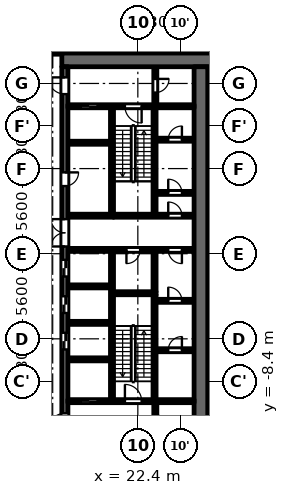
"""IFC4 building model, lengths in metres.
Left out: names, types, materials, properties, quantities, classifications, styles, units other than length and angle.
Written with IfcOpenShell. Run it as: python <this file> out.ifc"""

import sys

from ifc_helpers import new_model, si_unit, direction, frame, frame_2d, origin, place, context, subcontext, project, spatial, rectangle, extrude, element, fill, save


model = new_model("IFC4")
c1 = context("Model", 3, precision=1e-05, world=origin(), true_north=direction((0.0, 1.0)))
c2 = subcontext(c1, "Body", "Model", "MODEL_VIEW")
j1 = project(units=[si_unit("LENGTHUNIT", "METRE"), si_unit("PLANEANGLEUNIT", "RADIAN")], contexts=[c1])
p1 = place(None, origin())
s1 = spatial("IfcSite", under=j1, at=p1, CompositionType="ELEMENT")
p2 = place(p1, origin())
s2 = spatial("IfcBuilding", under=s1, at=p2, CompositionType="ELEMENT")
p3 = place(p2, frame((0.0, 0.0, 11.3)))
s3 = spatial("IfcBuildingStorey", under=s2, at=p3, CompositionType="ELEMENT", Elevation=11.3)
p4 = place(p3, frame((23.5, -2.5, 0.0), z_axis=(0.0, 0.0, 1.0), x_axis=(0.0, 1.0, 0.0)))
e1 = element("IfcWall", 1, at=p4, inside=s3, PredefinedType="PARTITIONING", context=c2, shape_type="SweptSolid", body=[
    extrude(rectangle(XDim=2.65, YDim=0.2, at=frame_2d((1.325, 0.0))), origin(), (0.0, 0.0, 1.0), 4.45),
])
p5 = place(p3, frame((20.7, 2.6, 0.0), z_axis=(0.0, 0.0, 1.0), x_axis=(0.0, 1.0, 0.0)))
e2 = element("IfcWall", 2, at=p5, inside=s3, PredefinedType="SHEAR", context=c2, shape_type="SweptSolid", body=[
    extrude(rectangle(XDim=7.0, YDim=0.2, at=frame_2d((3.5, 0.0))), origin(), (0.0, 0.0, 1.0), 4.45),
])
p6 = place(p3, frame((20.7, -9.6, 0.0), z_axis=(0.0, 0.0, 1.0), x_axis=(0.0, 1.0, 0.0)))
e3 = element("IfcWall", 3, at=p6, inside=s3, PredefinedType="SHEAR", context=c2, shape_type="SweptSolid", body=[
    extrude(rectangle(XDim=9.75, YDim=0.2, at=frame_2d((4.875, 0.0))), origin(), (0.0, 0.0, 1.0), 4.45),
])
p7 = place(p3, frame((20.8, 2.5, 0.0), z_axis=(0.0, 0.0, 1.0), x_axis=(1.0, 0.0, 0.0)))
e4 = element("IfcWall", 4, at=p7, inside=s3, PredefinedType="SHEAR", context=c2, shape_type="SweptSolid", body=[
    extrude(rectangle(XDim=5.3, YDim=0.2, at=frame_2d((2.65, 0.0))), origin(), (0.0, 0.0, 1.0), 4.45),
])
p8 = place(p7, frame((3.6, 0.0, 0.0)))
e5 = element("IfcOpeningElement", 5, at=p8, cuts=e4, PredefinedType="OPENING", context=c2, shape_type="SweptSolid", body=[
    extrude(rectangle(XDim=0.9, YDim=2.1, at=frame_2d((0.45, 1.05))), frame((0.0, 0.11, 0.0), z_axis=(0.0, -1.0, 0.0), x_axis=(1.0, 0.0, 0.0)), (0.0, 0.0, 1.0), 0.22),
])
p9 = place(p3, frame((20.8, 0.25, 0.0), z_axis=(0.0, 0.0, 1.0), x_axis=(1.0, 0.0, 0.0)))
e6 = element("IfcWall", 6, at=p9, inside=s3, PredefinedType="PARTITIONING", context=c2, shape_type="SweptSolid", body=[
    extrude(rectangle(XDim=5.3, YDim=0.2, at=frame_2d((2.65, 0.0))), origin(), (0.0, 0.0, 1.0), 4.45),
])
p10 = place(p9, frame((0.85, 0.0, 0.0)))
e7 = element("IfcOpeningElement", 7, at=p10, cuts=e6, PredefinedType="OPENING", context=c2, shape_type="SweptSolid", body=[
    extrude(rectangle(XDim=0.9, YDim=2.1, at=frame_2d((0.45, 1.05))), frame((0.0, 0.11, 0.0), z_axis=(0.0, -1.0, 0.0), x_axis=(1.0, 0.0, 0.0)), (0.0, 0.0, 1.0), 0.22),
])
p11 = place(p9, frame((3.6, 0.0, 0.0)))
e8 = element("IfcOpeningElement", 8, at=p11, cuts=e6, PredefinedType="OPENING", context=c2, shape_type="SweptSolid", body=[
    extrude(rectangle(XDim=0.9, YDim=2.1, at=frame_2d((0.45, 1.05))), frame((0.0, 0.11, 0.0), z_axis=(0.0, -1.0, 0.0), x_axis=(1.0, 0.0, 0.0)), (0.0, 0.0, 1.0), 0.22),
])
p12 = place(p3, frame((17.4, 12.75, 0.0), z_axis=(0.0, 0.0, 1.0), x_axis=(1.0, 0.0, 0.0)))
e9 = element("IfcWall", 9, at=p12, inside=s3, PredefinedType="SHEAR", context=c2, shape_type="SweptSolid", body=[
    extrude(rectangle(XDim=10.4, YDim=0.9, at=frame_2d((5.2, 0.0))), origin(), (0.0, 0.0, 1.0), 4.45),
])
p13 = place(p3, frame((17.6, -12.3, 0.0), z_axis=(0.0, 0.0, 1.0), x_axis=(0.0, 1.0, 0.0)))
e10 = element("IfcWall", 10, at=p13, inside=s3, PredefinedType="SHEAR", context=c2, shape_type="SweptSolid", body=[
    extrude(rectangle(XDim=24.6, YDim=0.4, at=frame_2d((12.3, 0.0))), origin(), (0.0, 0.0, 1.0), 4.45),
])
p14 = place(p13, frame((6.0, 0.0, 0.0)))
e11 = element("IfcOpeningElement", 11, at=p14, cuts=e10, PredefinedType="OPENING", context=c2, shape_type="SweptSolid", body=[
    extrude(rectangle(XDim=1.1, YDim=2.1, at=frame_2d((0.55, 1.05))), frame((0.0, 0.21, 0.0), z_axis=(0.0, -1.0, 0.0), x_axis=(1.0, 0.0, 0.0)), (0.0, 0.0, 1.0), 0.42),
])
p15 = place(p13, frame((8.4, 0.0, 0.0)))
e12 = element("IfcOpeningElement", 12, at=p15, cuts=e10, PredefinedType="OPENING", context=c2, shape_type="SweptSolid", body=[
    extrude(rectangle(XDim=1.1, YDim=2.1, at=frame_2d((0.55, 1.05))), frame((0.0, 0.21, 0.0), z_axis=(0.0, -1.0, 0.0), x_axis=(1.0, 0.0, 0.0)), (0.0, 0.0, 1.0), 0.42),
])
p16 = place(p13, frame((10.8, 0.0, 0.0)))
e13 = element("IfcOpeningElement", 13, at=p16, cuts=e10, PredefinedType="OPENING", context=c2, shape_type="SweptSolid", body=[
    extrude(rectangle(XDim=1.1, YDim=2.1, at=frame_2d((0.55, 1.05))), frame((0.0, 0.21, 0.0), z_axis=(0.0, -1.0, 0.0), x_axis=(1.0, 0.0, 0.0)), (0.0, 0.0, 1.0), 0.42),
])
p17 = place(p13, frame((16.75, 0.0, 0.0)))
e14 = element("IfcOpeningElement", 14, at=p17, cuts=e10, PredefinedType="OPENING", context=c2, shape_type="SweptSolid", body=[
    extrude(rectangle(XDim=0.9, YDim=2.1, at=frame_2d((0.45, 1.05))), frame((0.0, 0.21, 0.0), z_axis=(0.0, -1.0, 0.0), x_axis=(1.0, 0.0, 0.0)), (0.0, 0.0, 1.0), 0.42),
])
p18 = place(p13, frame((22.8, 0.0, 0.0)))
e15 = element("IfcOpeningElement", 15, at=p18, cuts=e10, PredefinedType="OPENING", context=c2, shape_type="SweptSolid", body=[
    extrude(rectangle(XDim=1.1, YDim=2.1, at=frame_2d((0.55, 1.05))), frame((0.0, 0.21, 0.0), z_axis=(0.0, -1.0, 0.0), x_axis=(1.0, 0.0, 0.0)), (0.0, 0.0, 1.0), 0.42),
])
p19 = place(p13, frame((0.7, 0.0, 0.0)))
e16 = element("IfcOpeningElement", 16, at=p19, cuts=e10, PredefinedType="OPENING", context=c2, shape_type="SweptSolid", body=[
    extrude(rectangle(XDim=1.1, YDim=2.1, at=frame_2d((0.55, 1.05))), frame((0.0, 0.21, 0.0), z_axis=(0.0, -1.0, 0.0), x_axis=(1.0, 0.0, 0.0)), (0.0, 0.0, 1.0), 0.42),
])
p20 = place(p13, frame((12.775, 0.0, 0.0)))
e17 = element("IfcOpeningElement", 17, at=p20, cuts=e10, PredefinedType="OPENING", context=c2, shape_type="SweptSolid", body=[
    extrude(rectangle(XDim=1.8, YDim=2.1, at=frame_2d((0.9, 1.05))), frame((0.0, 0.21, 0.0), z_axis=(0.0, -1.0, 0.0), x_axis=(1.0, 0.0, 0.0)), (0.0, 0.0, 1.0), 0.42),
])
p21 = place(p3, frame((26.55, -12.3, 0.0), z_axis=(0.0, 0.0, 1.0), x_axis=(0.0, 1.0, 0.0)))
e18 = element("IfcWall", 18, at=p21, inside=s3, PredefinedType="SHEAR", context=c2, shape_type="SweptSolid", body=[
    extrude(rectangle(XDim=24.6, YDim=0.9, at=frame_2d((12.3, 0.0))), origin(), (0.0, 0.0, 1.0), 4.45),
])
p22 = place(p3, frame((23.55, 9.8, 0.0), z_axis=(0.0, 0.0, 1.0), x_axis=(0.0, 1.0, 0.0)))
e19 = element("IfcWall", 19, at=p22, inside=s3, PredefinedType="PARTITIONING", context=c2, shape_type="SweptSolid", body=[
    extrude(rectangle(XDim=2.5, YDim=0.2, at=frame_2d((1.25, 0.0))), origin(), (0.0, 0.0, 1.0), 4.45),
])
p23 = place(p22, frame((0.8, 0.0, 0.0)))
e20 = element("IfcOpeningElement", 20, at=p23, cuts=e19, PredefinedType="OPENING", context=c2, shape_type="SweptSolid", body=[
    extrude(rectangle(XDim=0.9, YDim=2.1, at=frame_2d((0.45, 1.05))), frame((0.0, 0.11, 0.0), z_axis=(0.0, -1.0, 0.0), x_axis=(1.0, 0.0, 0.0)), (0.0, 0.0, 1.0), 0.22),
])
p24 = place(p3, frame((23.55, -12.3, 0.0), z_axis=(0.0, 0.0, 1.0), x_axis=(0.0, 1.0, 0.0)))
e21 = element("IfcWall", 21, at=p24, inside=s3, PredefinedType="PARTITIONING", context=c2, shape_type="SweptSolid", body=[
    extrude(rectangle(XDim=2.5, YDim=0.2, at=frame_2d((1.25, 0.0))), origin(), (0.0, 0.0, 1.0), 4.45),
])
p25 = place(p24, frame((0.8, 0.0, 0.0)))
e22 = element("IfcOpeningElement", 22, at=p25, cuts=e21, PredefinedType="OPENING", context=c2, shape_type="SweptSolid", body=[
    extrude(rectangle(XDim=0.9, YDim=2.1, at=frame_2d((0.45, 1.05))), frame((0.0, 0.11, 0.0), z_axis=(0.0, -1.0, 0.0), x_axis=(1.0, 0.0, 0.0)), (0.0, 0.0, 1.0), 0.22),
])
p26 = place(p3, frame((23.6, -6.35, 0.0), z_axis=(0.0, 0.0, 1.0), x_axis=(1.0, 0.0, 0.0)))
e23 = element("IfcWall", 23, at=p26, inside=s3, PredefinedType="PARTITIONING", context=c2, shape_type="SweptSolid", body=[
    extrude(rectangle(XDim=2.5, YDim=0.2, at=frame_2d((1.25, 0.0))), origin(), (0.0, 0.0, 1.0), 4.45),
])
p27 = place(p26, frame((0.8, 0.0, 0.0)))
e24 = element("IfcOpeningElement", 24, at=p27, cuts=e23, PredefinedType="OPENING", context=c2, shape_type="SweptSolid", body=[
    extrude(rectangle(XDim=0.9, YDim=2.1, at=frame_2d((0.45, 1.05))), frame((0.0, 0.11, 0.0), z_axis=(0.0, -1.0, 0.0), x_axis=(1.0, 0.0, 0.0)), (0.0, 0.0, 1.0), 0.22),
])
p28 = place(p3, frame((23.6, -3.1, 0.0), z_axis=(0.0, 0.0, 1.0), x_axis=(1.0, 0.0, 0.0)))
e25 = element("IfcWall", 25, at=p28, inside=s3, PredefinedType="PARTITIONING", context=c2, shape_type="SweptSolid", body=[
    extrude(rectangle(XDim=2.5, YDim=0.2, at=frame_2d((1.25, 0.0))), origin(), (0.0, 0.0, 1.0), 4.45),
])
p29 = place(p28, frame((0.8, 0.0, 0.0)))
e26 = element("IfcOpeningElement", 26, at=p29, cuts=e25, PredefinedType="OPENING", context=c2, shape_type="SweptSolid", body=[
    extrude(rectangle(XDim=0.9, YDim=2.1, at=frame_2d((0.45, 1.05))), frame((0.0, 0.11, 0.0), z_axis=(0.0, -1.0, 0.0), x_axis=(1.0, 0.0, 0.0)), (0.0, 0.0, 1.0), 0.22),
])
p30 = place(p3, frame((23.6, 4.0, 0.0), z_axis=(0.0, 0.0, 1.0), x_axis=(1.0, 0.0, 0.0)))
e27 = element("IfcWall", 27, at=p30, inside=s3, PredefinedType="PARTITIONING", context=c2, shape_type="SweptSolid", body=[
    extrude(rectangle(XDim=2.5, YDim=0.2, at=frame_2d((1.25, 0.0))), origin(), (0.0, 0.0, 1.0), 4.45),
])
p31 = place(p30, frame((0.8, 0.0, 0.0)))
e28 = element("IfcOpeningElement", 28, at=p31, cuts=e27, PredefinedType="OPENING", context=c2, shape_type="SweptSolid", body=[
    extrude(rectangle(XDim=0.9, YDim=2.1, at=frame_2d((0.45, 1.05))), frame((0.0, 0.11, 0.0), z_axis=(0.0, -1.0, 0.0), x_axis=(1.0, 0.0, 0.0)), (0.0, 0.0, 1.0), 0.22),
])
p32 = place(p3, frame((23.6, 7.5, 0.0), z_axis=(0.0, 0.0, 1.0), x_axis=(1.0, 0.0, 0.0)))
e29 = element("IfcWall", 29, at=p32, inside=s3, PredefinedType="PARTITIONING", context=c2, shape_type="SweptSolid", body=[
    extrude(rectangle(XDim=2.5, YDim=0.2, at=frame_2d((1.25, 0.0))), origin(), (0.0, 0.0, 1.0), 4.45),
])
p33 = place(p32, frame((0.8, 0.0, 0.0)))
e30 = element("IfcOpeningElement", 30, at=p33, cuts=e29, PredefinedType="OPENING", context=c2, shape_type="SweptSolid", body=[
    extrude(rectangle(XDim=0.9, YDim=2.1, at=frame_2d((0.45, 1.05))), frame((0.0, 0.11, 0.0), z_axis=(0.0, -1.0, 0.0), x_axis=(1.0, 0.0, 0.0)), (0.0, 0.0, 1.0), 0.22),
])
p34 = place(p3, frame((17.8, -9.7, 0.0), z_axis=(0.0, 0.0, 1.0), x_axis=(1.0, 0.0, 0.0)))
e31 = element("IfcWall", 31, at=p34, inside=s3, PredefinedType="SHEAR", context=c2, shape_type="SweptSolid", body=[
    extrude(rectangle(XDim=8.3, YDim=0.2, at=frame_2d((4.15, 0.0))), origin(), (0.0, 0.0, 1.0), 4.45),
])
p35 = place(p34, frame((0.85, 0.0, 0.0)))
e32 = element("IfcOpeningElement", 32, at=p35, cuts=e31, PredefinedType="OPENING", context=c2, shape_type="SweptSolid", body=[
    extrude(rectangle(XDim=1.1, YDim=2.1, at=frame_2d((0.55, 1.05))), frame((0.0, 0.11, 0.0), z_axis=(0.0, -1.0, 0.0), x_axis=(1.0, 0.0, 0.0)), (0.0, 0.0, 1.0), 0.22),
])
p36 = place(p34, frame((3.75, 0.0, 0.0)))
e33 = element("IfcOpeningElement", 33, at=p36, cuts=e31, PredefinedType="OPENING", context=c2, shape_type="SweptSolid", body=[
    extrude(rectangle(XDim=1.1, YDim=2.1, at=frame_2d((0.55, 1.05))), frame((0.0, 0.11, 0.0), z_axis=(0.0, -1.0, 0.0), x_axis=(1.0, 0.0, 0.0)), (0.0, 0.0, 1.0), 0.22),
])
for number, where, z_axis, x_axis in (
    (34, (17.8, -6.95, 0.0), (0.0, 0.0, 1.0), (1.0, 0.0, 0.0)),
    (35, (17.8, -4.55, 0.0), (0.0, 0.0, 1.0), (1.0, 0.0, 0.0)),
    (36, (17.8, -2.15, 0.0), (0.0, 0.0, 1.0), (1.0, 0.0, 0.0)),
):
    element("IfcWall", number, at=place(p3, frame(where, z_axis=z_axis, x_axis=x_axis)), inside=s3, PredefinedType="PARTITIONING", context=c2, shape_type="SweptSolid", body=[
        extrude(rectangle(XDim=2.8, YDim=0.2, at=frame_2d((1.4, 0.0))), origin(), (0.0, 0.0, 1.0), 4.45),
    ])
for number, where, z_axis, x_axis in (
    (37, (17.8, 0.25, 0.0), (0.0, 0.0, 1.0), (1.0, 0.0, 0.0)),
    (38, (17.8, 2.5, 0.0), (0.0, 0.0, 1.0), (1.0, 0.0, 0.0)),
):
    element("IfcWall", number, at=place(p3, frame(where, z_axis=z_axis, x_axis=x_axis)), inside=s3, PredefinedType="PARTITIONING", context=c2, shape_type="SweptSolid", body=[
        extrude(rectangle(XDim=3.0, YDim=0.2, at=frame_2d((1.5, 0.0))), origin(), (0.0, 0.0, 1.0), 4.45),
    ])
p37 = place(p3, frame((17.8, 7.3, 0.0), z_axis=(0.0, 0.0, 1.0), x_axis=(1.0, 0.0, 0.0)))
e39 = element("IfcWall", 39, at=p37, inside=s3, PredefinedType="PARTITIONING", context=c2, shape_type="SweptSolid", body=[
    extrude(rectangle(XDim=2.8, YDim=0.2, at=frame_2d((1.4, 0.0))), origin(), (0.0, 0.0, 1.0), 4.45),
])
p38 = place(p3, frame((17.8, 9.7, 0.0), z_axis=(0.0, 0.0, 1.0), x_axis=(1.0, 0.0, 0.0)))
e40 = element("IfcWall", 40, at=p38, inside=s3, PredefinedType="SHEAR", context=c2, shape_type="SweptSolid", body=[
    extrude(rectangle(XDim=8.3, YDim=0.2, at=frame_2d((4.15, 0.0))), origin(), (0.0, 0.0, 1.0), 4.45),
])
p39 = place(p38, frame((0.85, 0.0, 0.0)))
e41 = element("IfcOpeningElement", 41, at=p39, cuts=e40, PredefinedType="OPENING", context=c2, shape_type="SweptSolid", body=[
    extrude(rectangle(XDim=1.1, YDim=2.1, at=frame_2d((0.55, 1.05))), frame((0.0, 0.11, 0.0), z_axis=(0.0, -1.0, 0.0), x_axis=(1.0, 0.0, 0.0)), (0.0, 0.0, 1.0), 0.22),
])
p40 = place(p38, frame((3.75, 0.0, 0.0)))
e42 = element("IfcOpeningElement", 42, at=p40, cuts=e40, PredefinedType="OPENING", context=c2, shape_type="SweptSolid", body=[
    extrude(rectangle(XDim=1.1, YDim=2.1, at=frame_2d((0.55, 1.05))), frame((0.0, 0.11, 0.0), z_axis=(0.0, -1.0, 0.0), x_axis=(1.0, 0.0, 0.0)), (0.0, 0.0, 1.0), 0.22),
])
p41 = place(p3, frame((23.5, 2.6, 0.0), z_axis=(0.0, 0.0, 1.0), x_axis=(0.0, 1.0, 0.0)))
e43 = element("IfcWall", 43, at=p41, inside=s3, PredefinedType="SHEAR", context=c2, shape_type="SweptSolid", body=[
    extrude(rectangle(XDim=7.0, YDim=0.2, at=frame_2d((3.5, 0.0))), origin(), (0.0, 0.0, 1.0), 4.45),
])
p42 = place(p3, frame((23.5, -9.6, 0.0), z_axis=(0.0, 0.0, 1.0), x_axis=(0.0, 1.0, 0.0)))
e44 = element("IfcWall", 44, at=p42, inside=s3, PredefinedType="SHEAR", context=c2, shape_type="SweptSolid", body=[
    extrude(rectangle(XDim=6.9, YDim=0.2, at=frame_2d((3.45, 0.0))), origin(), (0.0, 0.0, 1.0), 4.45),
])
p43 = place(p3, frame((20.8, -2.6, 0.0), z_axis=(0.0, 0.0, 1.0), x_axis=(1.0, 0.0, 0.0)))
e45 = element("IfcWall", 45, at=p43, inside=s3, PredefinedType="SHEAR", context=c2, shape_type="SweptSolid", body=[
    extrude(rectangle(XDim=2.8, YDim=0.2, at=frame_2d((1.4, 0.0))), origin(), (0.0, 0.0, 1.0), 4.45),
])
p44 = place(p3, frame((-17.4, 13.2, 0.0), z_axis=(0.0, 0.0, 1.0), x_axis=(1.0, 0.0, 0.0)))
e46 = element("IfcWall", 46, at=p44, inside=s3, PredefinedType="PARTITIONING", context=c2, shape_type="SweptSolid", body=[
    extrude(rectangle(XDim=34.8, YDim=0.15, at=frame_2d((17.4, 0.0))), origin(), (0.0, 0.0, 1.0), 4.45),
])
p45 = place(p44, frame((3.05, 0.0, 0.0)))
e47 = element("IfcOpeningElement", 47, at=p45, cuts=e46, PredefinedType="OPENING", context=c2, shape_type="SweptSolid", body=[
    extrude(rectangle(XDim=1.8, YDim=2.1, at=frame_2d((0.9, 1.05))), frame((0.0, 0.085, 0.0), z_axis=(0.0, -1.0, 0.0), x_axis=(1.0, 0.0, 0.0)), (0.0, 0.0, 1.0), 0.17),
])
p46 = place(p44, frame((0.75, 0.0, 0.0)))
e48 = element("IfcOpeningElement", 48, at=p46, cuts=e46, PredefinedType="OPENING", context=c2, shape_type="SweptSolid", body=[
    extrude(rectangle(XDim=1.0, YDim=2.1, at=frame_2d((0.5, 1.05))), frame((0.0, 0.085, 0.0), z_axis=(0.0, -1.0, 0.0), x_axis=(1.0, 0.0, 0.0)), (0.0, 0.0, 1.0), 0.17),
])
p47 = place(p44, frame((33.15, 0.0, 0.0)))
e49 = element("IfcOpeningElement", 49, at=p47, cuts=e46, PredefinedType="OPENING", context=c2, shape_type="SweptSolid", body=[
    extrude(rectangle(XDim=1.0, YDim=2.1, at=frame_2d((0.5, 1.05))), frame((0.0, 0.085, 0.0), z_axis=(0.0, -1.0, 0.0), x_axis=(1.0, 0.0, 0.0)), (0.0, 0.0, 1.0), 0.17),
])
p48 = place(p35, origin())
e50 = element("IfcDoor", 50, at=p48, inside=s3, OperationType="DOUBLE_DOOR_SLIDING", PredefinedType="DOOR", context=c2, shape_type="SweptSolid", body=[
    extrude(rectangle(XDim=1.1, YDim=2.1, at=frame_2d((0.55, 1.05))), frame((0.0, 0.025, 0.0), z_axis=(0.0, -1.0, 0.0), x_axis=(1.0, 0.0, 0.0)), (0.0, 0.0, 1.0), 0.05),
])
fill(e32, e50)
p49 = place(p14, origin())
e51 = element("IfcDoor", 51, at=p49, inside=s3, OperationType="DOUBLE_DOOR_SLIDING", PredefinedType="DOOR", context=c2, shape_type="SweptSolid", body=[
    extrude(rectangle(XDim=1.1, YDim=2.1, at=frame_2d((0.55, 1.05))), frame((0.0, 0.025, 0.0), z_axis=(0.0, -1.0, 0.0), x_axis=(1.0, 0.0, 0.0)), (0.0, 0.0, 1.0), 0.05),
])
fill(e11, e51)
p50 = place(p15, origin())
e52 = element("IfcDoor", 52, at=p50, inside=s3, OperationType="DOUBLE_DOOR_SLIDING", PredefinedType="DOOR", context=c2, shape_type="SweptSolid", body=[
    extrude(rectangle(XDim=1.1, YDim=2.1, at=frame_2d((0.55, 1.05))), frame((0.0, 0.025, 0.0), z_axis=(0.0, -1.0, 0.0), x_axis=(1.0, 0.0, 0.0)), (0.0, 0.0, 1.0), 0.05),
])
fill(e12, e52)
p51 = place(p16, origin())
e53 = element("IfcDoor", 53, at=p51, inside=s3, OperationType="DOUBLE_DOOR_SLIDING", PredefinedType="DOOR", context=c2, shape_type="SweptSolid", body=[
    extrude(rectangle(XDim=1.1, YDim=2.1, at=frame_2d((0.55, 1.05))), frame((0.0, 0.025, 0.0), z_axis=(0.0, -1.0, 0.0), x_axis=(1.0, 0.0, 0.0)), (0.0, 0.0, 1.0), 0.05),
])
fill(e13, e53)
p52 = place(p17, origin())
e54 = element("IfcDoor", 54, at=p52, inside=s3, OperationType="SINGLE_SWING_RIGHT", PredefinedType="DOOR", context=c2, shape_type="SweptSolid", body=[
    extrude(rectangle(XDim=0.9, YDim=2.1, at=frame_2d((0.45, 1.05))), frame((0.0, 0.025, 0.0), z_axis=(0.0, -1.0, 0.0), x_axis=(1.0, 0.0, 0.0)), (0.0, 0.0, 1.0), 0.05),
])
fill(e14, e54)
p53 = place(p39, origin())
e55 = element("IfcDoor", 55, at=p53, inside=s3, OperationType="DOUBLE_DOOR_SLIDING", PredefinedType="DOOR", context=c2, shape_type="SweptSolid", body=[
    extrude(rectangle(XDim=1.1, YDim=2.1, at=frame_2d((0.55, 1.05))), frame((0.0, 0.025, 0.0), z_axis=(0.0, -1.0, 0.0), x_axis=(1.0, 0.0, 0.0)), (0.0, 0.0, 1.0), 0.05),
])
fill(e41, e55)
p54 = place(p18, origin())
e56 = element("IfcDoor", 56, at=p54, inside=s3, OperationType="SINGLE_SWING_LEFT", PredefinedType="DOOR", context=c2, shape_type="SweptSolid", body=[
    extrude(rectangle(XDim=1.1, YDim=2.1, at=frame_2d((0.55, 1.05))), frame((0.0, 0.025, 0.0), z_axis=(0.0, -1.0, 0.0), x_axis=(1.0, 0.0, 0.0)), (0.0, 0.0, 1.0), 0.05),
])
fill(e15, e56)
p55 = place(p19, origin())
e57 = element("IfcDoor", 57, at=p55, inside=s3, OperationType="SINGLE_SWING_RIGHT", PredefinedType="DOOR", context=c2, shape_type="SweptSolid", body=[
    extrude(rectangle(XDim=1.1, YDim=2.1, at=frame_2d((0.55, 1.05))), frame((0.0, 0.025, 0.0), z_axis=(0.0, -1.0, 0.0), x_axis=(1.0, 0.0, 0.0)), (0.0, 0.0, 1.0), 0.05),
])
fill(e16, e57)
p56 = place(p23, origin())
e58 = element("IfcDoor", 58, at=p56, inside=s3, OperationType="SINGLE_SWING_RIGHT", PredefinedType="DOOR", context=c2, shape_type="SweptSolid", body=[
    extrude(rectangle(XDim=0.9, YDim=2.1, at=frame_2d((0.45, 1.05))), frame((0.0, 0.025, 0.0), z_axis=(0.0, -1.0, 0.0), x_axis=(1.0, 0.0, 0.0)), (0.0, 0.0, 1.0), 0.05),
])
fill(e20, e58)
p57 = place(p40, origin())
e59 = element("IfcDoor", 59, at=p57, inside=s3, OperationType="SINGLE_SWING_RIGHT", PredefinedType="DOOR", context=c2, shape_type="SweptSolid", body=[
    extrude(rectangle(XDim=1.1, YDim=2.1, at=frame_2d((0.55, 1.05))), frame((0.0, 0.025, 0.0), z_axis=(0.0, -1.0, 0.0), x_axis=(1.0, 0.0, 0.0)), (0.0, 0.0, 1.0), 0.05),
])
fill(e42, e59)
p58 = place(p36, origin())
e60 = element("IfcDoor", 60, at=p58, inside=s3, OperationType="SINGLE_SWING_RIGHT", PredefinedType="DOOR", context=c2, shape_type="SweptSolid", body=[
    extrude(rectangle(XDim=1.1, YDim=2.1, at=frame_2d((0.55, 1.05))), frame((0.0, 0.025, 0.0), z_axis=(0.0, -1.0, 0.0), x_axis=(1.0, 0.0, 0.0)), (0.0, 0.0, 1.0), 0.05),
])
fill(e33, e60)
p59 = place(p20, origin())
e61 = element("IfcDoor", 61, at=p59, inside=s3, OperationType="DOUBLE_DOOR_SINGLE_SWING", PredefinedType="DOOR", context=c2, shape_type="SweptSolid", body=[
    extrude(rectangle(XDim=1.8, YDim=2.1, at=frame_2d((0.9, 1.05))), frame((0.0, 0.025, 0.0), z_axis=(0.0, -1.0, 0.0), x_axis=(1.0, 0.0, 0.0)), (0.0, 0.0, 1.0), 0.05),
])
fill(e17, e61)
p60 = place(p10, origin())
e62 = element("IfcDoor", 62, at=p60, inside=s3, OperationType="SINGLE_SWING_LEFT", PredefinedType="DOOR", context=c2, shape_type="SweptSolid", body=[
    extrude(rectangle(XDim=0.9, YDim=2.1, at=frame_2d((0.45, 1.05))), frame((0.0, 0.025, 0.0), z_axis=(0.0, -1.0, 0.0), x_axis=(1.0, 0.0, 0.0)), (0.0, 0.0, 1.0), 0.05),
])
fill(e7, e62)
p61 = place(p27, origin())
e63 = element("IfcDoor", 63, at=p61, inside=s3, OperationType="SINGLE_SWING_LEFT", PredefinedType="DOOR", context=c2, shape_type="SweptSolid", body=[
    extrude(rectangle(XDim=0.9, YDim=2.1, at=frame_2d((0.45, 1.05))), frame((0.0, 0.025, 0.0), z_axis=(0.0, -1.0, 0.0), x_axis=(1.0, 0.0, 0.0)), (0.0, 0.0, 1.0), 0.05),
])
fill(e24, e63)
p62 = place(p29, origin())
e64 = element("IfcDoor", 64, at=p62, inside=s3, OperationType="SINGLE_SWING_RIGHT", PredefinedType="DOOR", context=c2, shape_type="SweptSolid", body=[
    extrude(rectangle(XDim=0.9, YDim=2.1, at=frame_2d((0.45, 1.05))), frame((0.0, 0.025, 0.0), z_axis=(0.0, -1.0, 0.0), x_axis=(1.0, 0.0, 0.0)), (0.0, 0.0, 1.0), 0.05),
])
fill(e26, e64)
p63 = place(p11, origin())
e65 = element("IfcDoor", 65, at=p63, inside=s3, OperationType="SINGLE_SWING_RIGHT", PredefinedType="DOOR", context=c2, shape_type="SweptSolid", body=[
    extrude(rectangle(XDim=0.9, YDim=2.1, at=frame_2d((0.45, 1.05))), frame((0.0, 0.025, 0.0), z_axis=(0.0, -1.0, 0.0), x_axis=(1.0, 0.0, 0.0)), (0.0, 0.0, 1.0), 0.05),
])
fill(e8, e65)
p64 = place(p31, origin())
e66 = element("IfcDoor", 66, at=p64, inside=s3, OperationType="SINGLE_SWING_RIGHT", PredefinedType="DOOR", context=c2, shape_type="SweptSolid", body=[
    extrude(rectangle(XDim=0.9, YDim=2.1, at=frame_2d((0.45, 1.05))), frame((0.0, 0.025, 0.0), z_axis=(0.0, -1.0, 0.0), x_axis=(1.0, 0.0, 0.0)), (0.0, 0.0, 1.0), 0.05),
])
fill(e28, e66)
p65 = place(p33, origin())
e67 = element("IfcDoor", 67, at=p65, inside=s3, OperationType="SINGLE_SWING_LEFT", PredefinedType="DOOR", context=c2, shape_type="SweptSolid", body=[
    extrude(rectangle(XDim=0.9, YDim=2.1, at=frame_2d((0.45, 1.05))), frame((0.0, 0.025, 0.0), z_axis=(0.0, -1.0, 0.0), x_axis=(1.0, 0.0, 0.0)), (0.0, 0.0, 1.0), 0.05),
])
fill(e30, e67)
p66 = place(p8, origin())
e68 = element("IfcDoor", 68, at=p66, inside=s3, OperationType="SINGLE_SWING_RIGHT", PredefinedType="DOOR", context=c2, shape_type="SweptSolid", body=[
    extrude(rectangle(XDim=0.9, YDim=2.1, at=frame_2d((0.45, 1.05))), frame((0.0, 0.025, 0.0), z_axis=(0.0, -1.0, 0.0), x_axis=(1.0, 0.0, 0.0)), (0.0, 0.0, 1.0), 0.05),
])
fill(e5, e68)
save(model, sys.argv[1])
